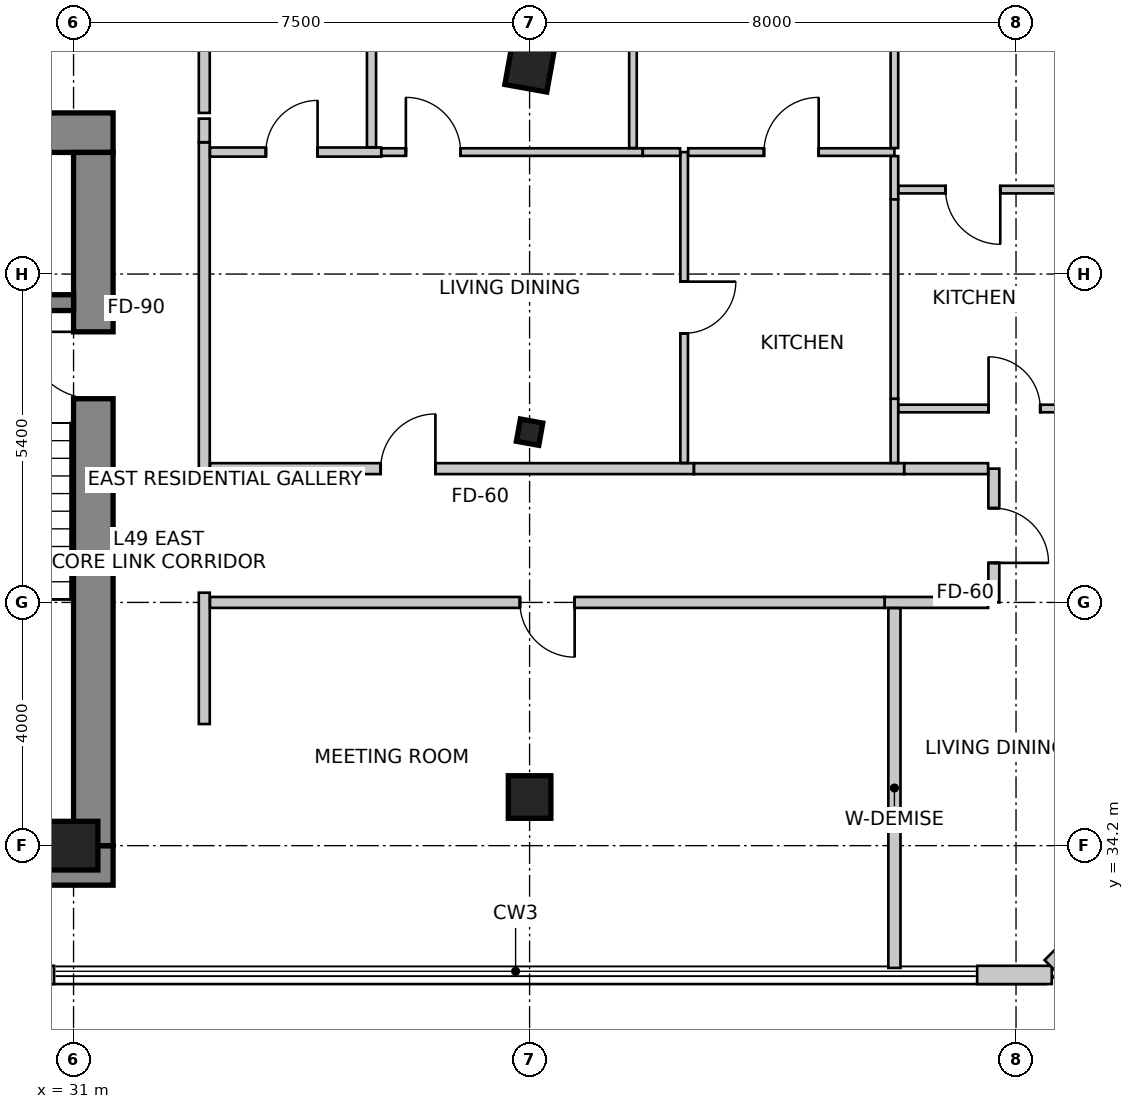
"""IFC4 building model, lengths in metres.
Left out: names, types, materials, properties, quantities, classifications, styles, units other than length and angle.
Written with IfcOpenShell. Run it as: python <this file> out.ifc"""

import sys

from ifc_helpers import new_model, si_unit, direction, frame, frame_2d, origin, origin_2d, place, context, subcontext, project, spatial, rectangle, i_section, extrude, source, transform, mapped, element, fill, save


model = new_model("IFC4")
c1 = context("Model", 3, precision=1e-05, world=origin(), true_north=direction((0.0, 1.0)))
c2 = subcontext(c1, "Body", "Model", "MODEL_VIEW")
j1 = project(units=[si_unit("LENGTHUNIT", "METRE"), si_unit("PLANEANGLEUNIT", "RADIAN")], contexts=[c1])
p1 = place(None, origin())
s1 = spatial("IfcSite", under=j1, at=p1, CompositionType="ELEMENT")
p2 = place(p1, origin())
s2 = spatial("IfcBuilding", under=s1, at=p2, CompositionType="ELEMENT")
p3 = place(p2, frame((0.0, 0.0, 197.4)))
s3 = spatial("IfcBuildingStorey", under=s2, at=p3, CompositionType="ELEMENT", Elevation=197.4)
p4 = place(p3, frame((15.95, 45.925, 0.0), z_axis=(0.0, 0.0, 1.0), x_axis=(1.0, 0.0, 0.0)))
e1 = element("IfcWall", 1, at=p4, inside=s3, PredefinedType="SHEAR", context=c2, shape_type="SweptSolid", body=[
    extrude(rectangle(XDim=15.7, YDim=0.65, at=frame_2d((7.85, 0.0))), origin(), (0.0, 0.0, 1.0), 3.5),
])
p5 = place(p3, frame((15.95, 33.875, 0.0), z_axis=(0.0, 0.0, 1.0), x_axis=(1.0, 0.0, 0.0)))
e2 = element("IfcWall", 2, at=p5, inside=s3, PredefinedType="SHEAR", context=c2, shape_type="SweptSolid", body=[
    extrude(rectangle(XDim=15.7, YDim=0.65, at=frame_2d((7.85, 0.0))), origin(), (0.0, 0.0, 1.0), 3.5),
])
m1 = source(origin(), c2, "Body", "SweptSolid", [
    extrude(rectangle(XDim=1.1, YDim=2.15, at=frame_2d((0.55, 1.075))), frame((0.0, 0.335, 0.0), z_axis=(0.0, -1.0, 0.0), x_axis=(1.0, 0.0, 0.0)), (0.0, 0.0, 1.0), 0.67),
])
p6 = place(p5, frame((10.08, 0.0, 0.0)))
e3 = element("IfcOpeningElement", 3, at=p6, cuts=e2, PredefinedType="OPENING", context=c2, shape_type="MappedRepresentation", body=[
    mapped(m1, transform((0.0, 0.0, 0.0), scale=1.0)),
])
p7 = place(p3, frame((31.325, 34.2, 0.0), z_axis=(0.0, 0.0, 1.0), x_axis=(0.0, 1.0, 0.0)))
e4 = element("IfcWall", 4, at=p7, inside=s3, PredefinedType="SHEAR", context=c2, shape_type="SweptSolid", body=[
    extrude(rectangle(XDim=11.4, YDim=0.65, at=frame_2d((5.7, 0.0))), origin(), (0.0, 0.0, 1.0), 3.5),
])
p8 = place(p7, frame((7.35, 0.0, 0.0)))
e5 = element("IfcOpeningElement", 5, at=p8, cuts=e4, PredefinedType="OPENING", context=c2, shape_type="MappedRepresentation", body=[
    mapped(m1, transform((0.0, 0.0, 0.0), scale=1.0)),
])
p9 = place(p3, frame((27.5, 43.13, 0.0), z_axis=(0.0, 0.0, 1.0), x_axis=(1.0, 0.0, 0.0)))
e6 = element("IfcWall", 6, at=p9, inside=s3, PredefinedType="SHEAR", context=c2, shape_type="SweptSolid", body=[
    extrude(rectangle(XDim=3.5, YDim=0.26, at=frame_2d((1.75, 0.0))), origin(), (0.0, 0.0, 1.0), 3.5),
])
m2 = source(origin(), c2, "Body", "SweptSolid", [
    extrude(rectangle(XDim=0.7, YDim=0.7, at=origin_2d()), origin(), (0.0, 0.0, 1.0), 3.5),
])
p10 = place(p3, frame((38.5, 47.0, 0.0), z_axis=(0.0, 0.0, 1.0), x_axis=(0.984195607969, -0.17708474032, 0.0)))
e7 = element("IfcColumn", 7, at=p10, inside=s3, PredefinedType="COLUMN", context=c2, shape_type="MappedRepresentation", body=[
    mapped(m2, transform((0.0, 0.0, 0.0), scale=1.0)),
])
m3 = source(origin(), c2, "Body", "SweptSolid", [
    extrude(rectangle(XDim=0.8, YDim=0.8, at=origin_2d()), origin(), (0.0, 0.0, 1.0), 3.5),
])
p11 = place(p3, frame((31.0, 34.2, 0.0), z_axis=(0.0, 0.0, 1.0), x_axis=(1.0, 0.0, 0.0)))
e8 = element("IfcColumn", 8, at=p11, inside=s3, PredefinedType="COLUMN", context=c2, shape_type="MappedRepresentation", body=[
    mapped(m3, transform((0.0, 0.0, 0.0), scale=1.0)),
])
p12 = place(p3, frame((38.5, 35.0, 0.0), z_axis=(0.0, 0.0, 1.0), x_axis=(1.0, 0.0, 0.0)))
e9 = element("IfcColumn", 9, at=p12, inside=s3, PredefinedType="COLUMN", context=c2, shape_type="MappedRepresentation", body=[
    mapped(m2, transform((0.0, 0.0, 0.0), scale=1.0)),
])
m4 = source(origin(), c2, "Body", "SweptSolid", [
    extrude(i_section(OverallWidth=0.374, OverallDepth=0.372, WebThickness=0.016, FlangeThickness=0.026, FilletRadius=0.015, at=origin_2d()), origin(), (0.0, 0.0, 1.0), 3.5),
])
p13 = place(p3, frame((38.5, 41.0, 0.0), z_axis=(0.0, 0.0, 1.0), x_axis=(0.984195607969, -0.17708474032, 0.0)))
e10 = element("IfcColumn", 10, at=p13, inside=s3, PredefinedType="COLUMN", context=c2, shape_type="MappedRepresentation", body=[
    mapped(m4, transform((0.0, 0.0, 0.0), scale=1.0)),
])
p14 = place(p3, frame((29.797, 32.074, 0.0), z_axis=(0.0, 0.0, 1.0), x_axis=(1.0, 0.0, 0.0)))
e11 = element("IfcWall", 11, at=p14, inside=s3, PredefinedType="SOLIDWALL", context=c2, shape_type="SweptSolid", body=[
    extrude(rectangle(XDim=0.882, YDim=0.3, at=frame_2d((0.441, 0.0))), origin(), (0.0, 0.0, 1.0), 3.25),
])
p15 = place(p3, frame((45.86, 32.074, 0.0), z_axis=(0.0, 0.0, 1.0), x_axis=(1.0, 0.0, 0.0)))
e12 = element("IfcWall", 12, at=p15, inside=s3, PredefinedType="SOLIDWALL", context=c2, shape_type="SweptSolid", body=[
    extrude(rectangle(XDim=1.228, YDim=0.3, at=frame_2d((0.614, 0.0))), origin(), (0.0, 0.0, 1.0), 3.25),
])
p16 = place(p3, frame((47.076, 32.212, 0.0), z_axis=(0.0, 0.0, 1.0), x_axis=(0.707106781187, 0.707106781187, 0.0)))
e13 = element("IfcWall", 13, at=p16, inside=s3, PredefinedType="SOLIDWALL", context=c2, shape_type="SweptSolid", body=[
    extrude(rectangle(XDim=4.922, YDim=0.3, at=frame_2d((2.461, 0.0))), origin(), (0.0, 0.0, 1.0), 3.25),
])
m5 = source(origin(), c2, "Body", "SweptSolid", [
    extrude(rectangle(XDim=1.5, YDim=1.8, at=frame_2d((0.75, 0.9))), frame((0.0, 0.16, 0.0), z_axis=(0.0, -1.0, 0.0), x_axis=(1.0, 0.0, 0.0)), (0.0, 0.0, 1.0), 0.32),
])
p17 = place(p16, frame((0.365, 0.0, 0.85)))
e14 = element("IfcOpeningElement", 14, at=p17, cuts=e13, PredefinedType="OPENING", context=c2, shape_type="MappedRepresentation", body=[
    mapped(m5, transform((0.0, 0.0, 0.0), scale=1.0)),
])
m6 = source(origin(), c2, "Body", "SweptSolid", [
    extrude(rectangle(XDim=2.1, YDim=2.0, at=frame_2d((1.05, 1.0))), frame((0.0, 0.16, 0.0), z_axis=(0.0, -1.0, 0.0), x_axis=(1.0, 0.0, 0.0)), (0.0, 0.0, 1.0), 0.32),
])
p18 = place(p16, frame((2.425, 0.0, 0.85)))
e15 = element("IfcOpeningElement", 15, at=p18, cuts=e13, PredefinedType="OPENING", context=c2, shape_type="MappedRepresentation", body=[
    mapped(m6, transform((0.0, 0.0, 0.0), scale=1.0)),
])
p19 = place(p3, frame((33.15, 47.706, 0.0), z_axis=(0.0, 0.0, 1.0), x_axis=(0.0, -1.0, 0.0)))
e16 = element("IfcWall", 16, at=p19, inside=s3, PredefinedType="PARTITIONING", context=c2, shape_type="SweptSolid", body=[
    extrude(rectangle(XDim=1.456, YDim=0.18, at=frame_2d((0.728, 0.0))), origin(), (0.0, 0.0, 1.0), 2.779),
])
p20 = place(p3, frame((33.15, 45.766, 0.0), z_axis=(0.0, 0.0, 1.0), x_axis=(0.0, -1.0, 0.0)))
e17 = element("IfcWall", 17, at=p20, inside=s3, PredefinedType="PARTITIONING", context=c2, shape_type="SweptSolid", body=[
    extrude(rectangle(XDim=5.526, YDim=0.18, at=frame_2d((2.763, 0.0))), origin(), (0.0, 0.0, 1.0), 2.779),
])
p21 = place(p3, frame((33.15, 46.156, 0.0), z_axis=(0.0, 0.0, 1.0), x_axis=(0.0, -1.0, 0.0)))
e18 = element("IfcWall", 18, at=p21, inside=s3, PredefinedType="PARTITIONING", context=c2, shape_type="SweptSolid", body=[
    extrude(rectangle(XDim=0.388, YDim=0.18, at=frame_2d((0.194, 0.0))), origin(), (0.0, 0.0, 1.0), 2.919),
])
p22 = place(p3, frame((33.15, 38.36, 0.0), z_axis=(0.0, 0.0, 1.0), x_axis=(0.0, -1.0, 0.0)))
e19 = element("IfcWall", 19, at=p22, inside=s3, PredefinedType="PARTITIONING", context=c2, shape_type="SweptSolid", body=[
    extrude(rectangle(XDim=2.16, YDim=0.18, at=frame_2d((1.08, 0.0))), origin(), (0.0, 0.0, 1.0), 3.25),
])
p23 = place(p3, frame((33.244, 40.4, 0.0), z_axis=(0.0, 0.0, 1.0), x_axis=(1.0, 0.0, 0.0)))
e20 = element("IfcWall", 20, at=p23, inside=s3, PredefinedType="PARTITIONING", context=c2, shape_type="SweptSolid", body=[
    extrude(rectangle(XDim=7.958, YDim=0.18, at=frame_2d((3.979, 0.0))), origin(), (0.0, 0.0, 1.0), 2.766),
])
m7 = source(origin(), c2, "Body", "SweptSolid", [
    extrude(rectangle(XDim=0.9, YDim=2.15, at=frame_2d((0.45, 1.075))), frame((0.0, 0.1, 0.0), z_axis=(0.0, -1.0, 0.0), x_axis=(1.0, 0.0, 0.0)), (0.0, 0.0, 1.0), 0.2),
])
p24 = place(p23, frame((2.807, 0.0, 0.0)))
e21 = element("IfcOpeningElement", 21, at=p24, cuts=e20, PredefinedType="OPENING", context=c2, shape_type="MappedRepresentation", body=[
    mapped(m7, transform((0.0, 0.0, 0.0), scale=1.0)),
])
p25 = place(p3, frame((41.204, 40.4, 0.0), z_axis=(0.0, 0.0, 1.0), x_axis=(1.0, 0.0, 0.0)))
e22 = element("IfcWall", 22, at=p25, inside=s3, PredefinedType="PARTITIONING", context=c2, shape_type="SweptSolid", body=[
    extrude(rectangle(XDim=3.456, YDim=0.18, at=frame_2d((1.728, 0.0))), origin(), (0.0, 0.0, 1.0), 2.779),
])
p26 = place(p3, frame((46.135, 40.4, 0.0), z_axis=(0.0, 0.0, 1.0), x_axis=(0.0, -1.0, 0.0)))
e23 = element("IfcWall", 23, at=p26, inside=s3, PredefinedType="PARTITIONING", context=c2, shape_type="SweptSolid", body=[
    extrude(rectangle(XDim=2.2, YDim=0.18, at=frame_2d((1.1, 0.0))), origin(), (0.0, 0.0, 1.0), 3.25),
])
p27 = place(p26, frame((0.65, 0.0, 0.0)))
e24 = element("IfcOpeningElement", 24, at=p27, cuts=e23, PredefinedType="OPENING", context=c2, shape_type="MappedRepresentation", body=[
    mapped(m7, transform((0.0, 0.0, 0.0), scale=1.0)),
])
p28 = place(p3, frame((44.662, 40.4, 0.0), z_axis=(0.0, 0.0, 1.0), x_axis=(1.0, 0.0, 0.0)))
e25 = element("IfcWall", 25, at=p28, inside=s3, PredefinedType="PARTITIONING", context=c2, shape_type="SweptSolid", body=[
    extrude(rectangle(XDim=1.379, YDim=0.18, at=frame_2d((0.689, 0.0))), origin(), (0.0, 0.0, 1.0), 3.25),
])
p29 = place(p3, frame((46.041, 38.2, 0.0), z_axis=(0.0, 0.0, 1.0), x_axis=(-1.0, 0.0, 0.0)))
e26 = element("IfcWall", 26, at=p29, inside=s3, PredefinedType="PARTITIONING", context=c2, shape_type="SweptSolid", body=[
    extrude(rectangle(XDim=1.701, YDim=0.18, at=frame_2d((0.851, 0.0))), origin(), (0.0, 0.0, 1.0), 2.919),
])
p30 = place(p3, frame((44.338, 38.2, 0.0), z_axis=(0.0, 0.0, 1.0), x_axis=(-1.0, 0.0, 0.0)))
e27 = element("IfcWall", 27, at=p30, inside=s3, PredefinedType="PARTITIONING", context=c2, shape_type="SweptSolid", body=[
    extrude(rectangle(XDim=11.094, YDim=0.18, at=frame_2d((5.547, 0.0))), origin(), (0.0, 0.0, 1.0), 2.766),
])
p31 = place(p30, frame((5.097, 0.0, 0.0)))
e28 = element("IfcOpeningElement", 28, at=p31, cuts=e27, PredefinedType="OPENING", context=c2, shape_type="MappedRepresentation", body=[
    mapped(m7, transform((0.0, 0.0, 0.0), scale=1.0)),
])
p32 = place(p3, frame((41.042, 45.606, 0.0), z_axis=(0.0, 0.0, 1.0), x_axis=(0.0, -1.0, 0.0)))
e29 = element("IfcWall", 29, at=p32, inside=s3, PredefinedType="PARTITIONING", context=c2, shape_type="SweptSolid", body=[
    extrude(rectangle(XDim=5.112, YDim=0.125, at=frame_2d((2.556, 0.0))), origin(), (0.0, 0.0, 1.0), 2.779),
])
m8 = source(origin(), c2, "Body", "SweptSolid", [
    extrude(rectangle(XDim=0.85, YDim=2.15, at=frame_2d((0.425, 1.075))), frame((0.0, 0.073, 0.0), z_axis=(0.0, -1.0, 0.0), x_axis=(1.0, 0.0, 0.0)), (0.0, 0.0, 1.0), 0.145),
])
p33 = place(p32, frame((2.131, 0.0, 0.0)))
e30 = element("IfcOpeningElement", 30, at=p33, cuts=e29, PredefinedType="OPENING", context=c2, shape_type="MappedRepresentation", body=[
    mapped(m8, transform((0.0, 0.0, 0.0), scale=1.0)),
])
p34 = place(p3, frame((33.244, 45.606, 0.0), z_axis=(0.0, 0.0, 1.0), x_axis=(1.0, 0.0, 0.0)))
e31 = element("IfcWall", 31, at=p34, inside=s3, PredefinedType="PARTITIONING", context=c2, shape_type="SweptSolid", body=[
    extrude(rectangle(XDim=2.816, YDim=0.15, at=frame_2d((1.408, 0.0))), origin(), (0.0, 0.0, 1.0), 2.779),
])
m9 = source(origin(), c2, "Body", "SweptSolid", [
    extrude(rectangle(XDim=0.85, YDim=2.15, at=frame_2d((0.425, 1.075))), frame((0.0, 0.085, 0.0), z_axis=(0.0, -1.0, 0.0), x_axis=(1.0, 0.0, 0.0)), (0.0, 0.0, 1.0), 0.17),
])
p35 = place(p34, frame((0.919, 0.0, 0.0)))
e32 = element("IfcOpeningElement", 32, at=p35, cuts=e31, PredefinedType="OPENING", context=c2, shape_type="MappedRepresentation", body=[
    mapped(m9, transform((0.0, 0.0, 0.0), scale=1.0)),
])
p36 = place(p3, frame((36.062, 45.606, 0.0), z_axis=(0.0, 0.0, 1.0), x_axis=(1.0, 0.0, 0.0)))
e33 = element("IfcWall", 33, at=p36, inside=s3, PredefinedType="PARTITIONING", context=c2, shape_type="SweptSolid", body=[
    extrude(rectangle(XDim=4.298, YDim=0.125, at=frame_2d((2.149, 0.0))), origin(), (0.0, 0.0, 1.0), 2.766),
])
m10 = source(origin(), c2, "Body", "SweptSolid", [
    extrude(rectangle(XDim=0.9, YDim=2.15, at=frame_2d((0.45, 1.075))), frame((0.0, 0.073, 0.0), z_axis=(0.0, -1.0, 0.0), x_axis=(1.0, 0.0, 0.0)), (0.0, 0.0, 1.0), 0.145),
])
p37 = place(p36, frame((0.403, 0.0, 0.0)))
e34 = element("IfcOpeningElement", 34, at=p37, cuts=e33, PredefinedType="OPENING", context=c2, shape_type="MappedRepresentation", body=[
    mapped(m10, transform((0.0, 0.0, 0.0), scale=1.0)),
])
p38 = place(p3, frame((40.362, 45.606, 0.0), z_axis=(0.0, 0.0, 1.0), x_axis=(1.0, 0.0, 0.0)))
e35 = element("IfcWall", 35, at=p38, inside=s3, PredefinedType="PARTITIONING", context=c2, shape_type="SweptSolid", body=[
    extrude(rectangle(XDim=0.614, YDim=0.125, at=frame_2d((0.307, 0.0))), origin(), (0.0, 0.0, 1.0), 3.25),
])
p39 = place(p3, frame((41.108, 45.606, 0.0), z_axis=(0.0, 0.0, 1.0), x_axis=(1.0, 0.0, 0.0)))
e36 = element("IfcWall", 36, at=p39, inside=s3, PredefinedType="PARTITIONING", context=c2, shape_type="SweptSolid", body=[
    extrude(rectangle(XDim=3.392, YDim=0.125, at=frame_2d((1.696, 0.0))), origin(), (0.0, 0.0, 1.0), 3.25),
])
p40 = place(p39, frame((1.246, 0.0, 0.0)))
e37 = element("IfcOpeningElement", 37, at=p40, cuts=e36, PredefinedType="OPENING", context=c2, shape_type="MappedRepresentation", body=[
    mapped(m10, transform((0.0, 0.0, 0.0), scale=1.0)),
])
p41 = place(p3, frame((44.5, 45.54, 0.0), z_axis=(0.0, 0.0, 1.0), x_axis=(0.0, -1.0, 0.0)))
e38 = element("IfcWall", 38, at=p41, inside=s3, PredefinedType="PARTITIONING", context=c2, shape_type="SweptSolid", body=[
    extrude(rectangle(XDim=0.71, YDim=0.125, at=frame_2d((0.355, 0.0))), origin(), (0.0, 0.0, 1.0), 3.25),
])
p42 = place(p3, frame((44.5, 41.549, 0.0), z_axis=(0.0, 0.0, 1.0), x_axis=(0.0, -1.0, 0.0)))
e39 = element("IfcWall", 39, at=p42, inside=s3, PredefinedType="PARTITIONING", context=c2, shape_type="SweptSolid", body=[
    extrude(rectangle(XDim=1.055, YDim=0.125, at=frame_2d((0.528, 0.0))), origin(), (0.0, 0.0, 1.0), 2.779),
])
p43 = place(p3, frame((44.5, 44.827, 0.0), z_axis=(0.0, 0.0, 1.0), x_axis=(0.0, -1.0, 0.0)))
e40 = element("IfcWall", 40, at=p43, inside=s3, PredefinedType="PARTITIONING", context=c2, shape_type="SweptSolid", body=[
    extrude(rectangle(XDim=3.276, YDim=0.125, at=frame_2d((1.638, 0.0))), origin(), (0.0, 0.0, 1.0), 2.779),
])
p44 = place(p3, frame((35.9, 50.34, 0.0), z_axis=(0.0, 0.0, 1.0), x_axis=(0.0, -1.0, 0.0)))
e41 = element("IfcWall", 41, at=p44, inside=s3, PredefinedType="PARTITIONING", context=c2, shape_type="SweptSolid", body=[
    extrude(rectangle(XDim=4.655, YDim=0.15, at=frame_2d((2.327, 0.0))), origin(), (0.0, 0.0, 1.0), 2.542),
])
p45 = place(p3, frame((40.2, 49.6, 0.0), z_axis=(0.0, 0.0, 1.0), x_axis=(0.0, -1.0, 0.0)))
e42 = element("IfcWall", 42, at=p45, inside=s3, PredefinedType="PARTITIONING", context=c2, shape_type="SweptSolid", body=[
    extrude(rectangle(XDim=3.927, YDim=0.125, at=frame_2d((1.964, 0.0))), origin(), (0.0, 0.0, 1.0), 2.542),
])
p46 = place(p3, frame((44.5, 48.86, 0.0), z_axis=(0.0, 0.0, 1.0), x_axis=(0.0, -1.0, 0.0)))
e43 = element("IfcWall", 43, at=p46, inside=s3, PredefinedType="PARTITIONING", context=c2, shape_type="SweptSolid", body=[
    extrude(rectangle(XDim=3.188, YDim=0.125, at=frame_2d((1.594, 0.0))), origin(), (0.0, 0.0, 1.0), 2.542),
])
p47 = place(p3, frame((48.5, 44.989, 0.0), z_axis=(0.0, 0.0, 1.0), x_axis=(-1.0, 0.0, 0.0)))
e44 = element("IfcWall", 44, at=p47, inside=s3, PredefinedType="PARTITIONING", context=c2, shape_type="SweptSolid", body=[
    extrude(rectangle(XDim=3.934, YDim=0.125, at=frame_2d((1.967, 0.0))), origin(), (0.0, 0.0, 1.0), 2.766),
])
p48 = place(p47, frame((2.259, 0.0, 0.0)))
e45 = element("IfcOpeningElement", 45, at=p48, cuts=e44, PredefinedType="OPENING", context=c2, shape_type="MappedRepresentation", body=[
    mapped(m10, transform((0.0, 0.0, 0.0), scale=1.0)),
])
p49 = place(p3, frame((44.566, 41.389, 0.0), z_axis=(0.0, 0.0, 1.0), x_axis=(1.0, 0.0, 0.0)))
e46 = element("IfcWall", 46, at=p49, inside=s3, PredefinedType="PARTITIONING", context=c2, shape_type="SweptSolid", body=[
    extrude(rectangle(XDim=3.934, YDim=0.125, at=frame_2d((1.967, 0.0))), origin(), (0.0, 0.0, 1.0), 2.766),
])
p50 = place(p49, frame((1.482, 0.0, 0.0)))
e47 = element("IfcOpeningElement", 47, at=p50, cuts=e46, PredefinedType="OPENING", context=c2, shape_type="MappedRepresentation", body=[
    mapped(m8, transform((0.0, 0.0, 0.0), scale=1.0)),
])
p51 = place(p3, frame((44.5, 32.189, 0.0), z_axis=(0.0, 0.0, 1.0), x_axis=(0.0, 1.0, 0.0)))
e48 = element("IfcWall", 48, at=p51, inside=s3, PredefinedType="PARTITIONING", context=c2, shape_type="SweptSolid", body=[
    extrude(rectangle(XDim=5.917, YDim=0.2, at=frame_2d((2.958, 0.0))), origin(), (0.0, 0.0, 1.0), 2.542),
])
m11 = source(origin(), c2, "Body", "SweptSolid", [
    extrude(rectangle(XDim=1.1, YDim=2.15, at=frame_2d((0.55, 1.075))), frame((0.0, 0.025, 0.0), z_axis=(0.0, -1.0, 0.0), x_axis=(1.0, 0.0, 0.0)), (0.0, 0.0, 1.0), 0.05),
])
p52 = place(p8, origin())
e49 = element("IfcDoor", 49, at=p52, inside=s3, OperationType="SINGLE_SWING_RIGHT", PredefinedType="DOOR", context=c2, shape_type="MappedRepresentation", body=[
    mapped(m11, transform((0.0, 0.0, 0.0), scale=1.0)),
])
fill(e5, e49)
m12 = source(origin(), c2, "Body", "SweptSolid", [
    extrude(rectangle(XDim=0.9, YDim=2.15, at=frame_2d((0.45, 1.075))), frame((0.0, 0.025, 0.0), z_axis=(0.0, -1.0, 0.0), x_axis=(1.0, 0.0, 0.0)), (0.0, 0.0, 1.0), 0.05),
])
p53 = place(p24, origin())
e50 = element("IfcDoor", 50, at=p53, inside=s3, OperationType="SINGLE_SWING_RIGHT", PredefinedType="DOOR", context=c2, shape_type="MappedRepresentation", body=[
    mapped(m12, transform((0.0, 0.0, 0.0), scale=1.0)),
])
fill(e21, e50)
m13 = source(origin(), c2, "Body", "SweptSolid", [
    extrude(rectangle(XDim=0.85, YDim=2.15, at=frame_2d((0.425, 1.075))), frame((0.0, 0.025, 0.0), z_axis=(0.0, -1.0, 0.0), x_axis=(1.0, 0.0, 0.0)), (0.0, 0.0, 1.0), 0.05),
])
p54 = place(p33, origin())
e51 = element("IfcDoor", 51, at=p54, inside=s3, OperationType="SINGLE_SWING_LEFT", PredefinedType="DOOR", context=c2, shape_type="MappedRepresentation", body=[
    mapped(m13, transform((0.0, 0.0, 0.0), scale=1.0)),
])
fill(e30, e51)
p55 = place(p35, origin())
e52 = element("IfcDoor", 52, at=p55, inside=s3, OperationType="SINGLE_SWING_RIGHT", PredefinedType="DOOR", context=c2, shape_type="MappedRepresentation", body=[
    mapped(m13, transform((0.0, 0.0, 0.0), scale=1.0)),
])
fill(e32, e52)
m14 = source(origin(), c2, "Body", "SweptSolid", [
    extrude(rectangle(XDim=0.9, YDim=2.15, at=frame_2d((0.45, 1.075))), frame((0.0, 0.025, 0.0), z_axis=(0.0, -1.0, 0.0), x_axis=(1.0, 0.0, 0.0)), (0.0, 0.0, 1.0), 0.05),
])
p56 = place(p37, origin())
e53 = element("IfcDoor", 53, at=p56, inside=s3, OperationType="SINGLE_SWING_LEFT", PredefinedType="DOOR", context=c2, shape_type="MappedRepresentation", body=[
    mapped(m14, transform((0.0, 0.0, 0.0), scale=1.0)),
])
fill(e34, e53)
p57 = place(p40, origin())
e54 = element("IfcDoor", 54, at=p57, inside=s3, OperationType="SINGLE_SWING_RIGHT", PredefinedType="DOOR", context=c2, shape_type="MappedRepresentation", body=[
    mapped(m14, transform((0.0, 0.0, 0.0), scale=1.0)),
])
fill(e37, e54)
p58 = place(p48, origin())
e55 = element("IfcDoor", 55, at=p58, inside=s3, OperationType="SINGLE_SWING_LEFT", PredefinedType="DOOR", context=c2, shape_type="MappedRepresentation", body=[
    mapped(m14, transform((0.0, 0.0, 0.0), scale=1.0)),
])
fill(e45, e55)
p59 = place(p27, origin())
e56 = element("IfcDoor", 56, at=p59, inside=s3, OperationType="SINGLE_SWING_RIGHT", PredefinedType="DOOR", context=c2, shape_type="MappedRepresentation", body=[
    mapped(m12, transform((0.0, 0.0, 0.0), scale=1.0)),
])
fill(e24, e56)
p60 = place(p50, origin())
e57 = element("IfcDoor", 57, at=p60, inside=s3, OperationType="SINGLE_SWING_LEFT", PredefinedType="DOOR", context=c2, shape_type="MappedRepresentation", body=[
    mapped(m13, transform((0.0, 0.0, 0.0), scale=1.0)),
])
fill(e47, e57)
p61 = place(p31, origin())
e58 = element("IfcDoor", 58, at=p61, inside=s3, OperationType="SINGLE_SWING_LEFT", PredefinedType="DOOR", context=c2, shape_type="MappedRepresentation", body=[
    mapped(m14, transform((0.0, 0.0, 0.0), scale=1.0)),
])
fill(e28, e58)
save(model, sys.argv[1])
